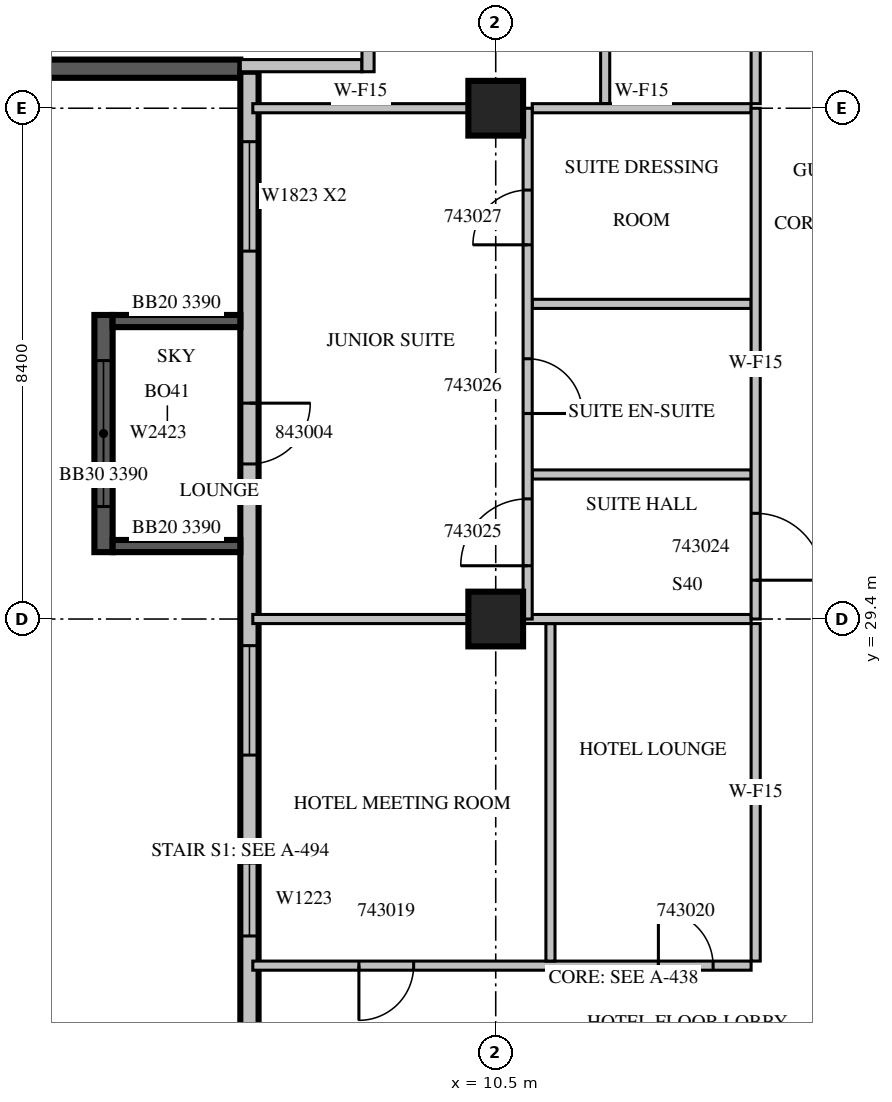
"""IFC4 building model, lengths in metres.
Left out: names, types, materials, properties, quantities, classifications, styles, units other than length and angle.
Written with IfcOpenShell. Run it as: python <this file> out.ifc"""

import sys

from ifc_helpers import new_model, si_unit, direction, frame, frame_2d, origin, origin_2d, place, context, subcontext, project, spatial, rectangle, extrude, source, transform, mapped, element, fill, save


model = new_model("IFC4")
c1 = context("Model", 3, precision=1e-05, world=origin(), true_north=direction((0.0, 1.0)))
c2 = subcontext(c1, "Body", "Model", "MODEL_VIEW")
j1 = project(units=[si_unit("LENGTHUNIT", "METRE"), si_unit("PLANEANGLEUNIT", "RADIAN")], contexts=[c1])
p1 = place(None, origin())
s1 = spatial("IfcSite", under=j1, at=p1, CompositionType="ELEMENT")
p2 = place(p1, origin())
s2 = spatial("IfcBuilding", under=s1, at=p2, CompositionType="ELEMENT")
p3 = place(p2, frame((0.0, 0.0, 196.8)))
s3 = spatial("IfcBuildingStorey", under=s2, at=p3, CompositionType="ELEMENT", Elevation=196.8)
m1 = source(origin(), c2, "Body", "SweptSolid", [
    extrude(rectangle(XDim=0.9, YDim=0.9, at=origin_2d()), origin(), (0.0, 0.0, 1.0), 3.8),
])
for number, where, z_axis, x_axis in (
    (1, (10.5, 29.4, 0.0), (0.0, 0.0, 1.0), (1.0, 0.0, 0.0)),
    (2, (10.5, 37.8, 0.0), (0.0, 0.0, 1.0), (1.0, 0.0, 0.0)),
):
    element("IfcColumn", number, at=place(p3, frame(where, z_axis=z_axis, x_axis=x_axis)), inside=s3, PredefinedType="COLUMN", context=c2, shape_type="MappedRepresentation", body=[
        mapped(m1, transform((0.0, 0.0, 0.0), scale=1.0)),
    ])
m2 = source(origin(), c2, "Body", "SweptSolid", [
    extrude(rectangle(XDim=6.1, YDim=0.3, at=frame_2d((3.05, 0.0))), origin(), (0.0, 0.0, 1.0), 3.4),
])
p4 = place(p3, frame((0.2, 38.45, 0.0), z_axis=(0.0, 0.0, 1.0), x_axis=(1.0, 0.0, 0.0)))
e3 = element("IfcWall", 3, at=p4, inside=s3, PredefinedType="SOLIDWALL", context=c2, shape_type="MappedRepresentation", body=[
    mapped(m2, transform((0.0, 0.0, 0.0), scale=1.0)),
])
m3 = source(origin(), c2, "Body", "SweptSolid", [
    extrude(rectangle(XDim=16.6, YDim=0.3, at=frame_2d((8.3, 0.0))), origin(), (0.0, 0.0, 1.0), 3.4),
])
p5 = place(p3, frame((6.45, 38.4, 0.0), z_axis=(0.0, 0.0, 1.0), x_axis=(0.0, -1.0, 0.0)))
e4 = element("IfcWall", 4, at=p5, inside=s3, PredefinedType="STANDARD", context=c2, shape_type="MappedRepresentation", body=[
    mapped(m3, transform((0.0, 0.0, 0.0), scale=1.0)),
])
m4 = source(origin(), c2, "Body", "SweptSolid", [
    extrude(rectangle(XDim=1.8, YDim=2.3, at=frame_2d((0.9, 1.15))), frame((0.0, 0.16, 0.0), z_axis=(0.0, -1.0, 0.0), x_axis=(1.0, 0.0, 0.0)), (0.0, 0.0, 1.0), 0.32),
])
p6 = place(p5, frame((1.15, 0.0, 0.6)))
e5 = element("IfcOpeningElement", 5, at=p6, cuts=e4, PredefinedType="OPENING", context=c2, shape_type="MappedRepresentation", body=[
    mapped(m4, transform((0.0, 0.0, 0.0), scale=1.0)),
])
p7 = place(p5, frame((9.438, 0.0, 0.6)))
e6 = element("IfcOpeningElement", 6, at=p7, cuts=e4, PredefinedType="OPENING", context=c2, shape_type="MappedRepresentation", body=[
    mapped(m4, transform((0.0, 0.0, 0.0), scale=1.0)),
])
m5 = source(origin(), c2, "Body", "SweptSolid", [
    extrude(rectangle(XDim=1.2, YDim=2.3, at=frame_2d((0.6, 1.15))), frame((0.0, 0.16, 0.0), z_axis=(0.0, -1.0, 0.0), x_axis=(1.0, 0.0, 0.0)), (0.0, 0.0, 1.0), 0.32),
])
p8 = place(p5, frame((13.012, 0.0, 0.6)))
e7 = element("IfcOpeningElement", 7, at=p8, cuts=e4, PredefinedType="OPENING", context=c2, shape_type="MappedRepresentation", body=[
    mapped(m5, transform((0.0, 0.0, 0.0), scale=1.0)),
])
m6 = source(origin(), c2, "Body", "SweptSolid", [
    extrude(rectangle(XDim=1.0, YDim=2.1, at=frame_2d((0.5, 1.05))), frame((0.0, 0.16, 0.0), z_axis=(0.0, -1.0, 0.0), x_axis=(1.0, 0.0, 0.0)), (0.0, 0.0, 1.0), 0.32),
])
p9 = place(p5, frame((5.45, 0.0, 0.0)))
e8 = element("IfcOpeningElement", 8, at=p9, cuts=e4, PredefinedType="OPENING", context=c2, shape_type="MappedRepresentation", body=[
    mapped(m6, transform((0.0, 0.0, 0.0), scale=1.0)),
])
p10 = place(p3, frame((4.05, 34.4, 0.0), z_axis=(0.0, 0.0, 1.0), x_axis=(0.0, -1.0, 0.0)))
e9 = element("IfcWall", 9, at=p10, inside=s3, PredefinedType="SOLIDWALL", context=c2, shape_type="SweptSolid", body=[
    extrude(rectangle(XDim=3.9, YDim=0.3, at=frame_2d((1.95, 0.0))), origin(), (0.0, 0.0, 1.0), 3.39),
])
m7 = source(origin(), c2, "Body", "SweptSolid", [
    extrude(rectangle(XDim=2.4, YDim=2.3, at=frame_2d((1.2, 1.15))), frame((0.0, 0.16, 0.0), z_axis=(0.0, -1.0, 0.0), x_axis=(1.0, 0.0, 0.0)), (0.0, 0.0, 1.0), 0.32),
])
p11 = place(p10, frame((0.75, 0.0, 0.6)))
e10 = element("IfcOpeningElement", 10, at=p11, cuts=e9, PredefinedType="OPENING", context=c2, shape_type="MappedRepresentation", body=[
    mapped(m7, transform((0.0, 0.0, 0.0), scale=1.0)),
])
p12 = place(p3, frame((6.3, 34.3, 0.0), z_axis=(0.0, 0.0, 1.0), x_axis=(-1.0, 0.0, 0.0)))
e11 = element("IfcWall", 11, at=p12, inside=s3, PredefinedType="SOLIDWALL", context=c2, shape_type="SweptSolid", body=[
    extrude(rectangle(XDim=2.1, YDim=0.2, at=frame_2d((1.05, 0.0))), origin(), (0.0, 0.0, 1.0), 3.39),
])
m8 = source(origin(), c2, "Body", "SweptSolid", [
    extrude(rectangle(XDim=2.1, YDim=0.2, at=frame_2d((1.05, 0.0))), origin(), (0.0, 0.0, 1.0), 3.39),
])
p13 = place(p3, frame((6.3, 30.6, 0.0), z_axis=(0.0, 0.0, 1.0), x_axis=(-1.0, 0.0, 0.0)))
e12 = element("IfcWall", 12, at=p13, inside=s3, PredefinedType="SOLIDWALL", context=c2, shape_type="MappedRepresentation", body=[
    mapped(m8, transform((0.0, 0.0, 0.0), scale=1.0)),
])
m9 = source(origin(), c2, "Body", "SweptSolid", [
    extrude(rectangle(XDim=2.0, YDim=0.2, at=frame_2d((1.0, 0.0))), origin(), (0.0, 0.0, 1.0), 3.4),
])
p14 = place(p3, frame((6.3, 38.5, 0.0), z_axis=(0.0, 0.0, 1.0), x_axis=(1.0, 0.0, 0.0)))
e13 = element("IfcWall", 13, at=p14, inside=s3, PredefinedType="PARTITIONING", context=c2, shape_type="MappedRepresentation", body=[
    mapped(m9, transform((0.0, 0.0, 0.0), scale=1.0)),
])
m10 = source(origin(), c2, "Body", "SweptSolid", [
    extrude(rectangle(XDim=5.45, YDim=0.2, at=frame_2d((2.725, 0.0))), origin(), (0.0, 0.0, 1.0), 3.4),
])
p15 = place(p3, frame((8.4, 38.4, 0.0), z_axis=(0.0, 0.0, 1.0), x_axis=(0.0, 1.0, 0.0)))
e14 = element("IfcWall", 14, at=p15, inside=s3, PredefinedType="PARTITIONING", context=c2, shape_type="MappedRepresentation", body=[
    mapped(m10, transform((0.0, 0.0, 0.0), scale=1.0)),
])
m11 = source(origin(), c2, "Body", "SweptSolid", [
    extrude(rectangle(XDim=1.2, YDim=2.1, at=frame_2d((0.6, 1.05))), frame((0.0, 0.11, 0.0), z_axis=(0.0, -1.0, 0.0), x_axis=(1.0, 0.0, 0.0)), (0.0, 0.0, 1.0), 0.22),
])
p16 = place(p15, frame((0.4, 0.0, 0.0)))
e15 = element("IfcOpeningElement", 15, at=p16, cuts=e14, PredefinedType="OPENING", context=c2, shape_type="MappedRepresentation", body=[
    mapped(m11, transform((0.0, 0.0, 0.0), scale=1.0)),
])
m12 = source(origin(), c2, "Body", "SweptSolid", [
    extrude(rectangle(XDim=0.9, YDim=2.1, at=frame_2d((0.45, 1.05))), frame((0.0, 0.11, 0.0), z_axis=(0.0, -1.0, 0.0), x_axis=(1.0, 0.0, 0.0)), (0.0, 0.0, 1.0), 0.22),
])
p17 = place(p15, frame((3.25, 0.0, 0.0)))
e16 = element("IfcOpeningElement", 16, at=p17, cuts=e14, PredefinedType="OPENING", context=c2, shape_type="MappedRepresentation", body=[
    mapped(m12, transform((0.0, 0.0, 0.0), scale=1.0)),
])
p18 = place(p3, frame((6.505, 23.7, 0.0), z_axis=(0.0, 0.0, 1.0), x_axis=(1.0, 0.0, 0.0)))
e17 = element("IfcWall", 17, at=p18, inside=s3, PredefinedType="PARTITIONING", context=c2, shape_type="SweptSolid", body=[
    extrude(rectangle(XDim=8.195, YDim=0.15, at=frame_2d((4.098, 0.0))), origin(), (0.0, 0.0, 1.0), 3.4),
])
m13 = source(origin(), c2, "Body", "SweptSolid", [
    extrude(rectangle(XDim=0.9, YDim=2.1, at=frame_2d((0.45, 1.05))), frame((0.0, 0.085, 0.0), z_axis=(0.0, -1.0, 0.0), x_axis=(1.0, 0.0, 0.0)), (0.0, 0.0, 1.0), 0.17),
])
p19 = place(p18, frame((1.745, 0.0, 0.0)))
e18 = element("IfcOpeningElement", 18, at=p19, cuts=e17, PredefinedType="OPENING", context=c2, shape_type="MappedRepresentation", body=[
    mapped(m13, transform((0.0, 0.0, 0.0), scale=1.0)),
])
p20 = place(p18, frame((6.67, 0.0, 0.0)))
e19 = element("IfcOpeningElement", 19, at=p20, cuts=e17, PredefinedType="OPENING", context=c2, shape_type="MappedRepresentation", body=[
    mapped(m13, transform((0.0, 0.0, 0.0), scale=1.0)),
])
m14 = source(origin(), c2, "Body", "SweptSolid", [
    extrude(rectangle(XDim=5.55, YDim=0.15, at=frame_2d((2.775, 0.0))), origin(), (0.0, 0.0, 1.0), 3.4),
])
for number, where, z_axis, x_axis in (
    (20, (11.4, 23.775, 0.0), (0.0, 0.0, 1.0), (0.0, 1.0, 0.0)),
    (21, (14.775, 23.775, 0.0), (0.0, 0.0, 1.0), (0.0, 1.0, 0.0)),
):
    element("IfcWall", number, at=place(p3, frame(where, z_axis=z_axis, x_axis=x_axis)), inside=s3, PredefinedType="PARTITIONING", context=c2, shape_type="MappedRepresentation", body=[
        mapped(m14, transform((0.0, 0.0, 0.0), scale=1.0)),
    ])
m15 = source(origin(), c2, "Body", "SweptSolid", [
    extrude(rectangle(XDim=3.546, YDim=0.15, at=frame_2d((1.773, 0.0))), origin(), (0.0, 0.0, 1.0), 3.4),
])
p21 = place(p3, frame((10.051, 29.4, 0.0), z_axis=(0.0, 0.0, 1.0), x_axis=(-1.0, 0.0, 0.0)))
e22 = element("IfcWall", 22, at=p21, inside=s3, PredefinedType="PARTITIONING", context=c2, shape_type="MappedRepresentation", body=[
    mapped(m15, transform((0.0, 0.0, 0.0), scale=1.0)),
])
m16 = source(origin(), c2, "Body", "SweptSolid", [
    extrude(rectangle(XDim=3.751, YDim=0.15, at=frame_2d((1.875, 0.0))), origin(), (0.0, 0.0, 1.0), 3.4),
])
p22 = place(p3, frame((14.7, 29.4, 0.0), z_axis=(0.0, 0.0, 1.0), x_axis=(-1.0, 0.0, 0.0)))
e23 = element("IfcWall", 23, at=p22, inside=s3, PredefinedType="PARTITIONING", context=c2, shape_type="MappedRepresentation", body=[
    mapped(m16, transform((0.0, 0.0, 0.0), scale=1.0)),
])
m17 = source(origin(), c2, "Body", "SweptSolid", [
    extrude(rectangle(XDim=6.45, YDim=0.15, at=frame_2d((3.225, 0.0))), origin(), (0.0, 0.0, 1.0), 3.4),
])
p23 = place(p3, frame((12.3, 44.325, 0.0), z_axis=(0.0, 0.0, 1.0), x_axis=(0.0, -1.0, 0.0)))
e24 = element("IfcWall", 24, at=p23, inside=s3, PredefinedType="PARTITIONING", context=c2, shape_type="MappedRepresentation", body=[
    mapped(m17, transform((0.0, 0.0, 0.0), scale=1.0)),
])
p24 = place(p3, frame((14.775, 37.875, 0.0), z_axis=(0.0, 0.0, 1.0), x_axis=(0.0, 1.0, 0.0)))
e25 = element("IfcWall", 25, at=p24, inside=s3, PredefinedType="PARTITIONING", context=c2, shape_type="MappedRepresentation", body=[
    mapped(m17, transform((0.0, 0.0, 0.0), scale=1.0)),
])
p25 = place(p24, frame((2.737, 0.0, 0.0)))
e26 = element("IfcOpeningElement", 26, at=p25, cuts=e25, PredefinedType="OPENING", context=c2, shape_type="MappedRepresentation", body=[
    mapped(m13, transform((0.0, 0.0, 0.0), scale=1.0)),
])
m18 = source(origin(), c2, "Body", "SweptSolid", [
    extrude(rectangle(XDim=3.6, YDim=0.15, at=frame_2d((1.8, 0.0))), origin(), (0.0, 0.0, 1.0), 3.4),
])
for number, where, z_axis, x_axis in (
    (27, (14.7, 31.777, 0.0), (0.0, 0.0, 1.0), (-1.0, 0.0, 0.0)),
    (28, (14.7, 34.583, 0.0), (0.0, 0.0, 1.0), (-1.0, 0.0, 0.0)),
):
    element("IfcWall", number, at=place(p3, frame(where, z_axis=z_axis, x_axis=x_axis)), inside=s3, PredefinedType="PARTITIONING", context=c2, shape_type="MappedRepresentation", body=[
        mapped(m18, transform((0.0, 0.0, 0.0), scale=1.0)),
    ])
p26 = place(p3, frame((10.051, 37.8, 0.0), z_axis=(0.0, 0.0, 1.0), x_axis=(-1.0, 0.0, 0.0)))
e29 = element("IfcWall", 29, at=p26, inside=s3, PredefinedType="PARTITIONING", context=c2, shape_type="MappedRepresentation", body=[
    mapped(m15, transform((0.0, 0.0, 0.0), scale=1.0)),
])
p27 = place(p3, frame((14.7, 37.8, 0.0), z_axis=(0.0, 0.0, 1.0), x_axis=(-1.0, 0.0, 0.0)))
e30 = element("IfcWall", 30, at=p27, inside=s3, PredefinedType="PARTITIONING", context=c2, shape_type="MappedRepresentation", body=[
    mapped(m18, transform((0.0, 0.0, 0.0), scale=1.0)),
])
m19 = source(origin(), c2, "Body", "SweptSolid", [
    extrude(rectangle(XDim=8.4, YDim=0.15, at=frame_2d((4.2, 0.0))), origin(), (0.0, 0.0, 1.0), 3.4),
])
p28 = place(p3, frame((11.025, 29.4, 0.0), z_axis=(0.0, 0.0, 1.0), x_axis=(0.0, 1.0, 0.0)))
e31 = element("IfcWall", 31, at=p28, inside=s3, PredefinedType="PARTITIONING", context=c2, shape_type="MappedRepresentation", body=[
    mapped(m19, transform((0.0, 0.0, 0.0), scale=1.0)),
])
m20 = source(origin(), c2, "Body", "SweptSolid", [
    extrude(rectangle(XDim=1.1, YDim=2.1, at=frame_2d((0.55, 1.05))), frame((0.0, 0.085, 0.0), z_axis=(0.0, -1.0, 0.0), x_axis=(1.0, 0.0, 0.0)), (0.0, 0.0, 1.0), 0.17),
])
p29 = place(p28, frame((0.876, 0.0, 0.0)))
e32 = element("IfcOpeningElement", 32, at=p29, cuts=e31, PredefinedType="OPENING", context=c2, shape_type="MappedRepresentation", body=[
    mapped(m20, transform((0.0, 0.0, 0.0), scale=1.0)),
])
p30 = place(p28, frame((3.38, 0.0, 0.0)))
e33 = element("IfcOpeningElement", 33, at=p30, cuts=e31, PredefinedType="OPENING", context=c2, shape_type="MappedRepresentation", body=[
    mapped(m13, transform((0.0, 0.0, 0.0), scale=1.0)),
])
p31 = place(p28, frame((6.154, 0.0, 0.0)))
e34 = element("IfcOpeningElement", 34, at=p31, cuts=e31, PredefinedType="OPENING", context=c2, shape_type="MappedRepresentation", body=[
    mapped(m13, transform((0.0, 0.0, 0.0), scale=1.0)),
])
p32 = place(p3, frame((14.775, 29.4, 0.0), z_axis=(0.0, 0.0, 1.0), x_axis=(0.0, 1.0, 0.0)))
e35 = element("IfcWall", 35, at=p32, inside=s3, PredefinedType="PARTITIONING", context=c2, shape_type="MappedRepresentation", body=[
    mapped(m19, transform((0.0, 0.0, 0.0), scale=1.0)),
])
p33 = place(p32, frame((0.638, 0.0, 0.0)))
e36 = element("IfcOpeningElement", 36, at=p33, cuts=e35, PredefinedType="OPENING", context=c2, shape_type="MappedRepresentation", body=[
    mapped(m20, transform((0.0, 0.0, 0.0), scale=1.0)),
])
m21 = source(origin(), c2, "Body", "SweptSolid", [
    extrude(rectangle(XDim=1.8, YDim=2.3, at=frame_2d((0.9, 1.15))), frame((0.0, 0.03, 0.0), z_axis=(0.0, -1.0, 0.0), x_axis=(1.0, 0.0, 0.0)), (0.0, 0.0, 1.0), 0.06),
])
p34 = place(p6, origin())
e37 = element("IfcWindow", 37, at=p34, inside=s3, PartitioningType="SINGLE_PANEL", PredefinedType="WINDOW", context=c2, shape_type="MappedRepresentation", body=[
    mapped(m21, transform((0.0, 0.0, 0.0), scale=1.0)),
])
fill(e5, e37)
p35 = place(p7, origin())
e38 = element("IfcWindow", 38, at=p35, inside=s3, PartitioningType="SINGLE_PANEL", PredefinedType="WINDOW", context=c2, shape_type="MappedRepresentation", body=[
    mapped(m21, transform((0.0, 0.0, 0.0), scale=1.0)),
])
fill(e6, e38)
m22 = source(origin(), c2, "Body", "SweptSolid", [
    extrude(rectangle(XDim=1.2, YDim=2.3, at=frame_2d((0.6, 1.15))), frame((0.0, 0.03, 0.0), z_axis=(0.0, -1.0, 0.0), x_axis=(1.0, 0.0, 0.0)), (0.0, 0.0, 1.0), 0.06),
])
p36 = place(p8, origin())
e39 = element("IfcWindow", 39, at=p36, inside=s3, PartitioningType="SINGLE_PANEL", PredefinedType="WINDOW", context=c2, shape_type="MappedRepresentation", body=[
    mapped(m22, transform((0.0, 0.0, 0.0), scale=1.0)),
])
fill(e7, e39)
m23 = source(origin(), c2, "Body", "SweptSolid", [
    extrude(rectangle(XDim=2.4, YDim=2.3, at=frame_2d((1.2, 1.15))), frame((0.0, 0.03, 0.0), z_axis=(0.0, -1.0, 0.0), x_axis=(1.0, 0.0, 0.0)), (0.0, 0.0, 1.0), 0.06),
])
p37 = place(p11, origin())
e40 = element("IfcWindow", 40, at=p37, inside=s3, PartitioningType="SINGLE_PANEL", PredefinedType="WINDOW", context=c2, shape_type="MappedRepresentation", body=[
    mapped(m23, transform((0.0, 0.0, 0.0), scale=1.0)),
])
fill(e10, e40)
m24 = source(origin(), c2, "Body", "SweptSolid", [
    extrude(rectangle(XDim=0.9, YDim=2.1, at=frame_2d((0.45, 1.05))), frame((0.0, 0.025, 0.0), z_axis=(0.0, -1.0, 0.0), x_axis=(1.0, 0.0, 0.0)), (0.0, 0.0, 1.0), 0.05),
])
p38 = place(p19, origin())
e41 = element("IfcDoor", 41, at=p38, inside=s3, OperationType="SINGLE_SWING_RIGHT", PredefinedType="DOOR", context=c2, shape_type="MappedRepresentation", body=[
    mapped(m24, transform((0.0, 0.0, 0.0), scale=1.0)),
])
fill(e18, e41)
p39 = place(p20, origin())
e42 = element("IfcDoor", 42, at=p39, inside=s3, OperationType="SINGLE_SWING_LEFT", PredefinedType="DOOR", context=c2, shape_type="MappedRepresentation", body=[
    mapped(m24, transform((0.0, 0.0, 0.0), scale=1.0)),
])
fill(e19, e42)
m25 = source(origin(), c2, "Body", "SweptSolid", [
    extrude(rectangle(XDim=1.1, YDim=2.1, at=frame_2d((0.55, 1.05))), frame((0.0, 0.025, 0.0), z_axis=(0.0, -1.0, 0.0), x_axis=(1.0, 0.0, 0.0)), (0.0, 0.0, 1.0), 0.05),
])
p40 = place(p33, origin())
e43 = element("IfcDoor", 43, at=p40, inside=s3, OperationType="SINGLE_SWING_RIGHT", PredefinedType="DOOR", context=c2, shape_type="MappedRepresentation", body=[
    mapped(m25, transform((0.0, 0.0, 0.0), scale=1.0)),
])
fill(e36, e43)
p41 = place(p29, origin())
e44 = element("IfcDoor", 44, at=p41, inside=s3, OperationType="SINGLE_SWING_LEFT", PredefinedType="DOOR", context=c2, shape_type="MappedRepresentation", body=[
    mapped(m25, transform((0.0, 0.0, 0.0), scale=1.0)),
])
fill(e32, e44)
p42 = place(p30, origin())
e45 = element("IfcDoor", 45, at=p42, inside=s3, OperationType="SINGLE_SWING_RIGHT", PredefinedType="DOOR", context=c2, shape_type="MappedRepresentation", body=[
    mapped(m24, transform((0.0, 0.0, 0.0), scale=1.0)),
])
fill(e33, e45)
p43 = place(p31, origin())
e46 = element("IfcDoor", 46, at=p43, inside=s3, OperationType="SINGLE_SWING_LEFT", PredefinedType="DOOR", context=c2, shape_type="MappedRepresentation", body=[
    mapped(m24, transform((0.0, 0.0, 0.0), scale=1.0)),
])
fill(e34, e46)
m26 = source(origin(), c2, "Body", "SweptSolid", [
    extrude(rectangle(XDim=1.0, YDim=2.1, at=frame_2d((0.5, 1.05))), frame((0.0, 0.025, 0.0), z_axis=(0.0, -1.0, 0.0), x_axis=(1.0, 0.0, 0.0)), (0.0, 0.0, 1.0), 0.05),
])
p44 = place(p9, origin())
e47 = element("IfcDoor", 47, at=p44, inside=s3, OperationType="SINGLE_SWING_LEFT", PredefinedType="DOOR", context=c2, shape_type="MappedRepresentation", body=[
    mapped(m26, transform((0.0, 0.0, 0.0), scale=1.0)),
])
fill(e8, e47)
save(model, sys.argv[1])
